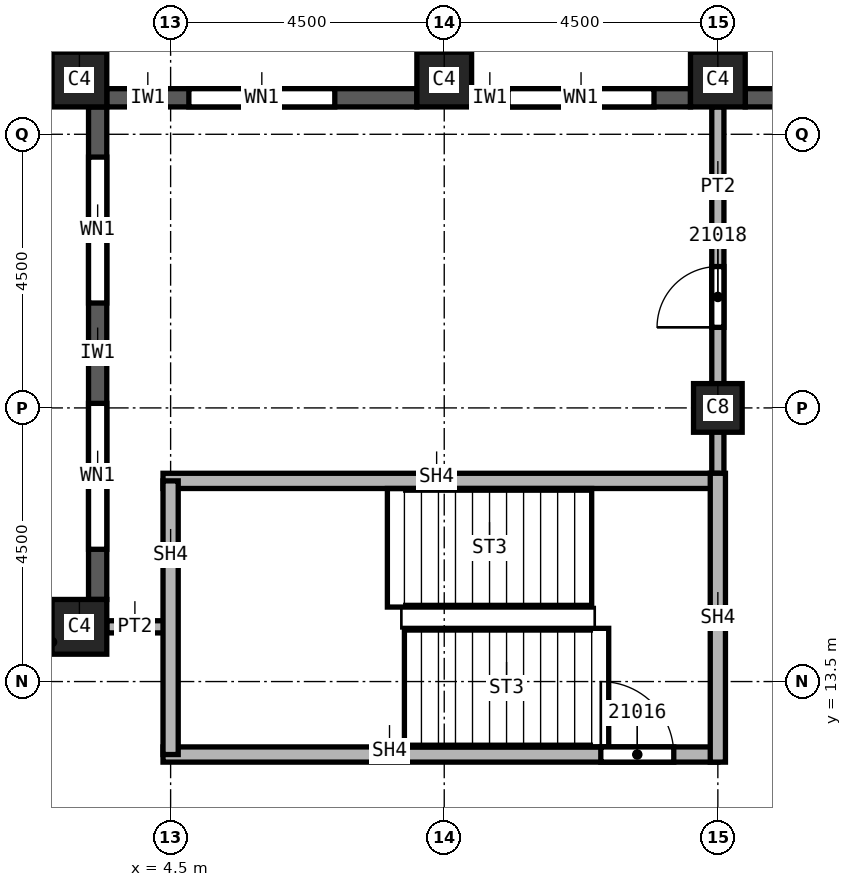
"""IFC4 building model, lengths in metres.
Left out: names, types, materials, properties, quantities, classifications, styles, units other than length and angle.
Written with IfcOpenShell. Run it as: python <this file> out.ifc"""

import sys

from ifc_helpers import new_model, si_unit, direction, frame, frame_2d, origin, origin_2d, place, context, subcontext, project, spatial, rectangle, extrude, element, fill, save


model = new_model("IFC4")
c1 = context("Model", 3, precision=1e-05, world=origin(), true_north=direction((0.0, 1.0)))
c2 = subcontext(c1, "Body", "Model", "MODEL_VIEW")
j1 = project(units=[si_unit("LENGTHUNIT", "METRE"), si_unit("PLANEANGLEUNIT", "RADIAN")], contexts=[c1])
p1 = place(None, origin())
s1 = spatial("IfcSite", under=j1, at=p1, CompositionType="ELEMENT")
p2 = place(p1, origin())
s2 = spatial("IfcBuilding", under=s1, at=p2, CompositionType="ELEMENT")
p3 = place(p2, frame((0.0, 0.0, 308.0)))
s3 = spatial("IfcBuildingStorey", under=s2, at=p3, CompositionType="ELEMENT", Elevation=308.0)
p4 = place(p3, frame((13.5, 18.0, 0.0), z_axis=(0.0, 0.0, 1.0), x_axis=(1.0, 0.0, 0.0)))
e1 = element("IfcColumn", 1, at=p4, inside=s3, PredefinedType="COLUMN", context=c2, shape_type="SweptSolid", body=[
    extrude(rectangle(XDim=0.8, YDim=0.8, at=origin_2d()), origin(), (0.0, 0.0, 1.0), 3.74),
])
for number, where, z_axis, x_axis in (
    (2, (3.0, 23.4, 0.0), (0.0, 0.0, 1.0), (1.0, 0.0, 0.0)),
    (3, (9.0, 23.4, 0.0), (0.0, 0.0, 1.0), (1.0, 0.0, 0.0)),
    (4, (13.5, 23.4, 0.0), (0.0, 0.0, 1.0), (1.0, 0.0, 0.0)),
    (5, (3.0, 14.4, 0.0), (0.0, 0.0, 1.0), (1.0, 0.0, 0.0)),
):
    element("IfcColumn", number, at=place(p3, frame(where, z_axis=z_axis, x_axis=x_axis)), inside=s3, PredefinedType="COLUMN", context=c2, shape_type="SweptSolid", body=[
        extrude(rectangle(XDim=0.9, YDim=0.9, at=origin_2d()), origin(), (0.0, 0.0, 1.0), 3.74),
    ])
p5 = place(p3, frame((17.55, 23.1, 0.0), z_axis=(0.0, 0.0, 1.0), x_axis=(-1.0, 0.0, 0.0)))
e6 = element("IfcWall", 6, at=p5, inside=s3, PredefinedType="SOLIDWALL", context=c2, shape_type="SweptSolid", body=[
    extrude(rectangle(XDim=3.6, YDim=0.3, at=frame_2d((1.8, 0.0))), origin(), (0.0, 0.0, 1.0), 3.14),
])
p6 = place(p5, frame((0.775, 0.0, 0.8)))
e7 = element("IfcOpeningElement", 7, at=p6, cuts=e6, PredefinedType="OPENING", context=c2, shape_type="SweptSolid", body=[
    extrude(rectangle(XDim=1.0, YDim=1.95, at=frame_2d((0.5, 0.975))), frame((0.0, 0.15, 0.0), z_axis=(0.0, -1.0, 0.0), x_axis=(1.0, 0.0, 0.0)), (0.0, 0.0, 1.0), 0.3),
])
p7 = place(p5, frame((2.375, 0.0, 0.8)))
e8 = element("IfcOpeningElement", 8, at=p7, cuts=e6, PredefinedType="OPENING", context=c2, shape_type="SweptSolid", body=[
    extrude(rectangle(XDim=0.6, YDim=1.95, at=frame_2d((0.3, 0.975))), frame((0.0, 0.15, 0.0), z_axis=(0.0, -1.0, 0.0), x_axis=(1.0, 0.0, 0.0)), (0.0, 0.0, 1.0), 0.3),
])
p8 = place(p3, frame((13.05, 23.1, 0.0), z_axis=(0.0, 0.0, 1.0), x_axis=(-1.0, 0.0, 0.0)))
e9 = element("IfcWall", 9, at=p8, inside=s3, PredefinedType="SOLIDWALL", context=c2, shape_type="SweptSolid", body=[
    extrude(rectangle(XDim=3.6, YDim=0.3, at=frame_2d((1.8, 0.0))), origin(), (0.0, 0.0, 1.0), 3.14),
])
p9 = place(p8, frame((0.6, 0.0, 0.8)))
e10 = element("IfcOpeningElement", 10, at=p9, cuts=e9, PredefinedType="OPENING", context=c2, shape_type="SweptSolid", body=[
    extrude(rectangle(XDim=2.4, YDim=1.95, at=frame_2d((1.2, 0.975))), frame((0.0, 0.15, 0.0), z_axis=(0.0, -1.0, 0.0), x_axis=(1.0, 0.0, 0.0)), (0.0, 0.0, 1.0), 0.3),
])
p10 = place(p3, frame((8.55, 23.1, 0.0), z_axis=(0.0, 0.0, 1.0), x_axis=(-1.0, 0.0, 0.0)))
e11 = element("IfcWall", 11, at=p10, inside=s3, PredefinedType="SOLIDWALL", context=c2, shape_type="SweptSolid", body=[
    extrude(rectangle(XDim=5.1, YDim=0.3, at=frame_2d((2.55, 0.0))), origin(), (0.0, 0.0, 1.0), 3.14),
])
p11 = place(p10, frame((1.35, 0.0, 0.8)))
e12 = element("IfcOpeningElement", 12, at=p11, cuts=e11, PredefinedType="OPENING", context=c2, shape_type="SweptSolid", body=[
    extrude(rectangle(XDim=2.4, YDim=1.95, at=frame_2d((1.2, 0.975))), frame((0.0, 0.15, 0.0), z_axis=(0.0, -1.0, 0.0), x_axis=(1.0, 0.0, 0.0)), (0.0, 0.0, 1.0), 0.3),
])
p12 = place(p3, frame((3.3, 22.95, 0.0), z_axis=(0.0, 0.0, 1.0), x_axis=(0.0, -1.0, 0.0)))
e13 = element("IfcWall", 13, at=p12, inside=s3, PredefinedType="SOLIDWALL", context=c2, shape_type="SweptSolid", body=[
    extrude(rectangle(XDim=8.1, YDim=0.3, at=frame_2d((4.05, 0.0))), origin(), (0.0, 0.0, 1.0), 3.14),
])
p13 = place(p12, frame((0.825, 0.0, 0.8)))
e14 = element("IfcOpeningElement", 14, at=p13, cuts=e13, PredefinedType="OPENING", context=c2, shape_type="SweptSolid", body=[
    extrude(rectangle(XDim=2.4, YDim=1.95, at=frame_2d((1.2, 0.975))), frame((0.0, 0.15, 0.0), z_axis=(0.0, -1.0, 0.0), x_axis=(1.0, 0.0, 0.0)), (0.0, 0.0, 1.0), 0.3),
])
p14 = place(p12, frame((4.875, 0.0, 0.8)))
e15 = element("IfcOpeningElement", 15, at=p14, cuts=e13, PredefinedType="OPENING", context=c2, shape_type="SweptSolid", body=[
    extrude(rectangle(XDim=2.4, YDim=1.95, at=frame_2d((1.2, 0.975))), frame((0.0, 0.15, 0.0), z_axis=(0.0, -1.0, 0.0), x_axis=(1.0, 0.0, 0.0)), (0.0, 0.0, 1.0), 0.3),
])
p15 = place(p3, frame((3.45, 14.4, 0.0), z_axis=(0.0, 0.0, 1.0), x_axis=(1.0, 0.0, 0.0)))
e16 = element("IfcWall", 16, at=p15, inside=s3, PredefinedType="PARTITIONING", context=c2, shape_type="SweptSolid", body=[
    extrude(rectangle(XDim=1.05, YDim=0.2, at=frame_2d((0.525, 0.0))), origin(), (0.0, 0.0, 1.0), 3.74),
])
p16 = place(p3, frame((13.5, 16.675, 0.0), z_axis=(0.0, 0.0, 1.0), x_axis=(0.0, 1.0, 0.0)))
e17 = element("IfcWall", 17, at=p16, inside=s3, PredefinedType="PARTITIONING", context=c2, shape_type="SweptSolid", body=[
    extrude(rectangle(XDim=6.275, YDim=0.2, at=frame_2d((3.137, 0.0))), origin(), (0.0, 0.0, 1.0), 3.74),
])
p17 = place(p16, frame((2.65, 0.0, 0.0)))
e18 = element("IfcOpeningElement", 18, at=p17, cuts=e17, PredefinedType="OPENING", context=c2, shape_type="SweptSolid", body=[
    extrude(rectangle(XDim=1.0, YDim=2.1, at=frame_2d((0.5, 1.05))), frame((0.0, 0.1, 0.0), z_axis=(0.0, -1.0, 0.0), x_axis=(1.0, 0.0, 0.0)), (0.0, 0.0, 1.0), 0.2),
])
p18 = place(p3, frame((4.375, 12.3, 0.0), z_axis=(0.0, 0.0, 1.0), x_axis=(1.0, 0.0, 0.0)))
e19 = element("IfcWall", 19, at=p18, inside=s3, PredefinedType="SOLIDWALL", context=c2, shape_type="SweptSolid", body=[
    extrude(rectangle(XDim=9.125, YDim=0.25, at=frame_2d((4.562, 0.0))), origin(), (0.0, 0.0, 1.0), 3.74),
])
p19 = place(p18, frame((7.2, 0.0, 0.0)))
e20 = element("IfcOpeningElement", 20, at=p19, cuts=e19, PredefinedType="OPENING", context=c2, shape_type="SweptSolid", body=[
    extrude(rectangle(XDim=1.2, YDim=2.1, at=frame_2d((0.6, 1.05))), frame((0.0, 0.125, 0.0), z_axis=(0.0, -1.0, 0.0), x_axis=(1.0, 0.0, 0.0)), (0.0, 0.0, 1.0), 0.25),
])
p20 = place(p3, frame((4.375, 16.8, 0.0), z_axis=(0.0, 0.0, 1.0), x_axis=(1.0, 0.0, 0.0)))
e21 = element("IfcWall", 21, at=p20, inside=s3, PredefinedType="SOLIDWALL", context=c2, shape_type="SweptSolid", body=[
    extrude(rectangle(XDim=9.125, YDim=0.25, at=frame_2d((4.562, 0.0))), origin(), (0.0, 0.0, 1.0), 3.74),
])
p21 = place(p3, frame((4.5, 12.3, 0.0), z_axis=(0.0, 0.0, 1.0), x_axis=(0.0, 1.0, 0.0)))
e22 = element("IfcWall", 22, at=p21, inside=s3, PredefinedType="SOLIDWALL", context=c2, shape_type="SweptSolid", body=[
    extrude(rectangle(XDim=4.5, YDim=0.25, at=frame_2d((2.25, 0.0))), origin(), (0.0, 0.0, 1.0), 3.74),
])
p22 = place(p3, frame((13.5, 12.175, 0.0), z_axis=(0.0, 0.0, 1.0), x_axis=(0.0, 1.0, 0.0)))
e23 = element("IfcWall", 23, at=p22, inside=s3, PredefinedType="SOLIDWALL", context=c2, shape_type="SweptSolid", body=[
    extrude(rectangle(XDim=4.75, YDim=0.25, at=frame_2d((2.375, 0.0))), origin(), (0.0, 0.0, 1.0), 3.74),
])
p23 = place(p9, origin())
e24 = element("IfcWindow", 24, at=p23, inside=s3, PartitioningType="SINGLE_PANEL", PredefinedType="WINDOW", context=c2, shape_type="SweptSolid", body=[
    extrude(rectangle(XDim=2.4, YDim=1.95, at=frame_2d((1.2, 0.975))), frame((0.0, 0.03, 0.0), z_axis=(0.0, -1.0, 0.0), x_axis=(1.0, 0.0, 0.0)), (0.0, 0.0, 1.0), 0.06),
])
fill(e10, e24)
p24 = place(p11, origin())
e25 = element("IfcWindow", 25, at=p24, inside=s3, PartitioningType="SINGLE_PANEL", PredefinedType="WINDOW", context=c2, shape_type="SweptSolid", body=[
    extrude(rectangle(XDim=2.4, YDim=1.95, at=frame_2d((1.2, 0.975))), frame((0.0, 0.03, 0.0), z_axis=(0.0, -1.0, 0.0), x_axis=(1.0, 0.0, 0.0)), (0.0, 0.0, 1.0), 0.06),
])
fill(e12, e25)
p25 = place(p13, origin())
e26 = element("IfcWindow", 26, at=p25, inside=s3, PartitioningType="SINGLE_PANEL", PredefinedType="WINDOW", context=c2, shape_type="SweptSolid", body=[
    extrude(rectangle(XDim=2.4, YDim=1.95, at=frame_2d((1.2, 0.975))), frame((0.0, 0.03, 0.0), z_axis=(0.0, -1.0, 0.0), x_axis=(1.0, 0.0, 0.0)), (0.0, 0.0, 1.0), 0.06),
])
fill(e14, e26)
p26 = place(p14, origin())
e27 = element("IfcWindow", 27, at=p26, inside=s3, PartitioningType="SINGLE_PANEL", PredefinedType="WINDOW", context=c2, shape_type="SweptSolid", body=[
    extrude(rectangle(XDim=2.4, YDim=1.95, at=frame_2d((1.2, 0.975))), frame((0.0, 0.03, 0.0), z_axis=(0.0, -1.0, 0.0), x_axis=(1.0, 0.0, 0.0)), (0.0, 0.0, 1.0), 0.06),
])
fill(e15, e27)
p27 = place(p19, origin())
e28 = element("IfcDoor", 28, at=p27, inside=s3, OperationType="SINGLE_SWING_LEFT", PredefinedType="DOOR", context=c2, shape_type="SweptSolid", body=[
    extrude(rectangle(XDim=1.2, YDim=2.1, at=frame_2d((0.6, 1.05))), frame((0.0, 0.025, 0.0), z_axis=(0.0, -1.0, 0.0), x_axis=(1.0, 0.0, 0.0)), (0.0, 0.0, 1.0), 0.05),
])
fill(e20, e28)
p28 = place(p17, origin())
e29 = element("IfcDoor", 29, at=p28, inside=s3, OperationType="SINGLE_SWING_LEFT", PredefinedType="DOOR", context=c2, shape_type="SweptSolid", body=[
    extrude(rectangle(XDim=1.0, YDim=2.1, at=frame_2d((0.5, 1.05))), frame((0.0, 0.025, 0.0), z_axis=(0.0, -1.0, 0.0), x_axis=(1.0, 0.0, 0.0)), (0.0, 0.0, 1.0), 0.05),
])
fill(e18, e29)
save(model, sys.argv[1])
